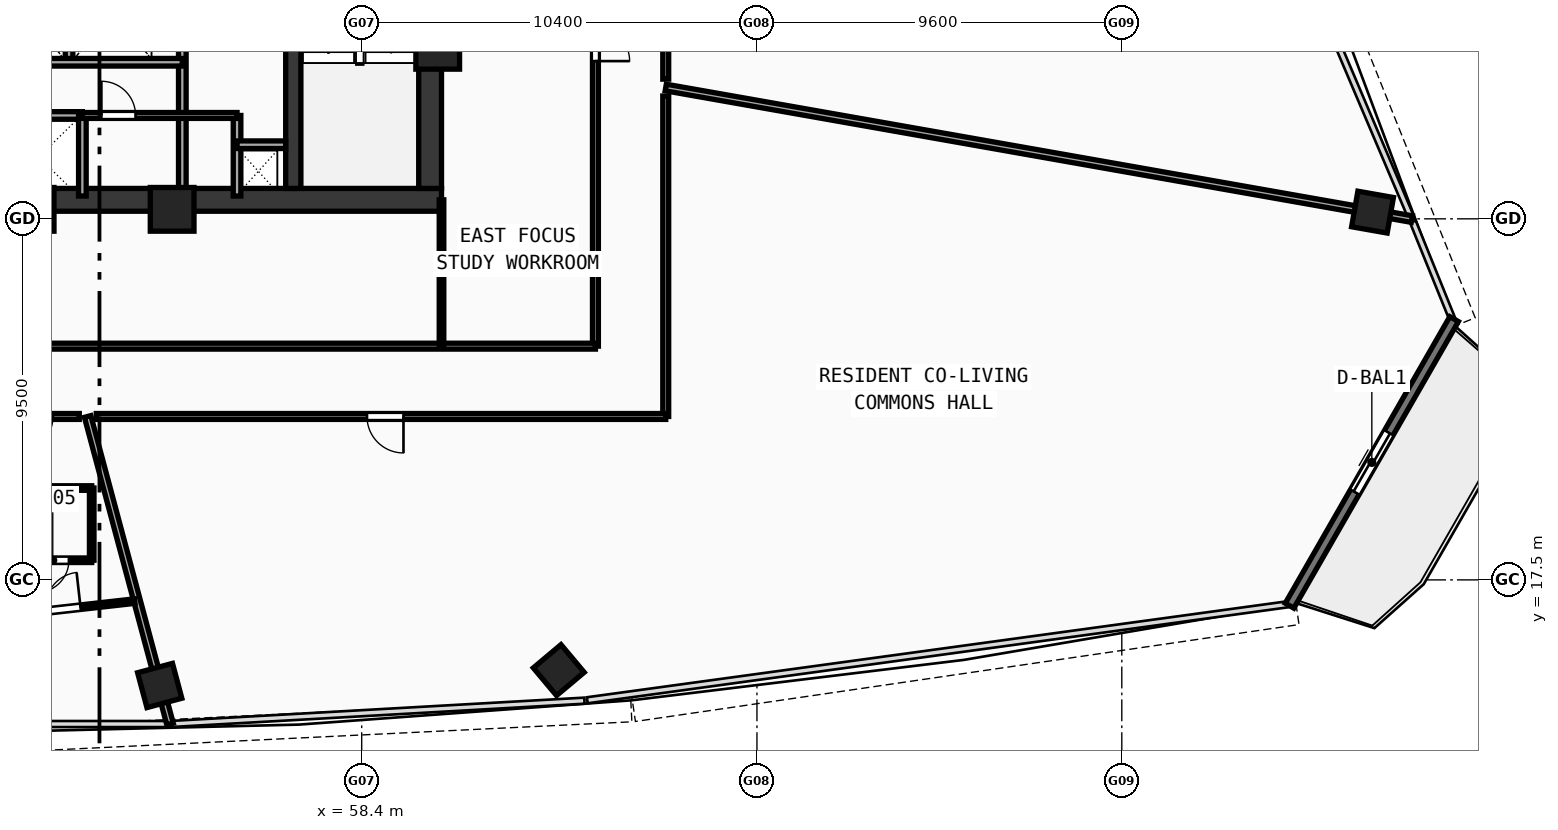
"""IFC4 building model, lengths in metres.
Left out: names, types, materials, properties, quantities, classifications, styles, units other than length and angle.
Written with IfcOpenShell. Run it as: python <this file> out.ifc"""

import sys

from ifc_helpers import new_model, si_unit, direction, frame, frame_2d, origin, origin_with_axes, origin_2d, place, context, subcontext, project, spatial, rectangle, hollow_rectangle, extrude, source, transform, mapped, element, fill, save


model = new_model("IFC4")
c1 = context("Model", 3, precision=1e-05, world=origin(), true_north=direction((0.0, 1.0)))
c2 = subcontext(c1, "Body", "Model", "MODEL_VIEW")
j1 = project(units=[si_unit("LENGTHUNIT", "METRE"), si_unit("PLANEANGLEUNIT", "RADIAN")], contexts=[c1])
p1 = place(None, origin())
s1 = spatial("IfcSite", under=j1, at=p1, CompositionType="ELEMENT")
p2 = place(p1, origin())
s2 = spatial("IfcBuilding", under=s1, at=p2, CompositionType="ELEMENT")
p3 = place(p2, frame((0.0, 0.0, 162.95)))
s3 = spatial("IfcBuildingStorey", under=s2, at=p3, CompositionType="ELEMENT", Elevation=162.95)
p4 = place(p3, frame((35.5, 27.5, 0.0), z_axis=(0.0, 0.0, 1.0), x_axis=(1.0, 0.0, 0.0)))
e1 = element("IfcWall", 1, at=p4, inside=s3, PredefinedType="SHEAR", context=c2, shape_type="SweptSolid", body=[
    extrude(rectangle(XDim=25.0, YDim=0.6, at=frame_2d((12.5, 0.0))), origin(), (0.0, 0.0, 1.0), 3.42),
])
p5 = place(p3, frame((60.2, 27.8, 0.0), z_axis=(0.0, 0.0, 1.0), x_axis=(0.0, 1.0, 0.0)))
e2 = element("IfcWall", 2, at=p5, inside=s3, PredefinedType="SHEAR", context=c2, shape_type="SweptSolid", body=[
    extrude(rectangle(XDim=12.1, YDim=0.6, at=frame_2d((6.05, 0.0))), origin(), (0.0, 0.0, 1.0), 3.42),
])
p6 = place(p3, frame((56.6, 27.8, 0.0), z_axis=(0.0, 0.0, 1.0), x_axis=(0.0, 1.0, 0.0)))
e3 = element("IfcWall", 3, at=p6, inside=s3, PredefinedType="SHEAR", context=c2, shape_type="SweptSolid", body=[
    extrude(rectangle(XDim=12.1, YDim=0.4, at=frame_2d((6.05, 0.0))), origin(), (0.0, 0.0, 1.0), 3.42),
])
p7 = place(p6, frame((9.95, 0.0, 0.0)))
e4 = element("IfcOpeningElement", 4, at=p7, cuts=e3, PredefinedType="OPENING", context=c2, shape_type="SweptSolid", body=[
    extrude(rectangle(XDim=1.1, YDim=2.1, at=frame_2d((0.55, 1.05))), frame((0.0, 0.21, 0.0), z_axis=(0.0, -1.0, 0.0), x_axis=(1.0, 0.0, 0.0)), (0.0, 0.0, 1.0), 0.42),
])
m1 = source(origin(), c2, "Body", "SweptSolid", [
    extrude(hollow_rectangle(XDim=1.15, YDim=1.15, WallThickness=0.048, at=origin_2d()), origin(), (0.0, 0.0, 1.0), 3.68),
])
for number, where, z_axis, x_axis in (
    (5, (49.729, 27.25, -0.26), (0.0, 0.0, 1.0), (1.0, 0.0, 0.0)),
    (6, (53.412, 27.25, -0.26), (0.0, 0.0, 1.0), (1.0, 0.0, 0.0)),
    (7, (60.4, 31.513, -0.26), (0.0, 0.0, 1.0), (1.0, 0.0, 0.0)),
):
    element("IfcColumn", number, at=place(p3, frame(where, z_axis=z_axis, x_axis=x_axis)), inside=s3, PredefinedType="COLUMN", context=c2, shape_type="MappedRepresentation", body=[
        mapped(m1, transform((0.0, 0.0, 0.0), scale=1.0)),
    ])
m2 = source(origin(), c2, "Body", "SweptSolid", [
    extrude(hollow_rectangle(XDim=0.95, YDim=0.95, WallThickness=0.04, at=origin_2d()), origin(), (0.0, 0.0, 1.0), 3.68),
])
for number, where, z_axis, x_axis in (
    (8, (53.085, 14.722, -0.26), (0.0, 0.0, 1.0), (0.966, 0.259, 0.0)),
    (9, (63.585, 15.126, -0.26), (0.0, 0.0, 1.0), (0.766, 0.643, 0.0)),
    (10, (84.997, 27.177, -0.26), (0.0, 0.0, 1.0), (0.174, 0.985, 0.0)),
):
    element("IfcColumn", number, at=place(p3, frame(where, z_axis=z_axis, x_axis=x_axis)), inside=s3, PredefinedType="COLUMN", context=c2, shape_type="MappedRepresentation", body=[
        mapped(m2, transform((0.0, 0.0, 0.0), scale=1.0)),
    ])
p8 = place(p3, frame((82.814, 16.821, 0.0), z_axis=(0.0, 0.0, 1.0), x_axis=(0.497939858886, 0.867211564114, 0.0)))
e11 = element("IfcWall", 11, at=p8, inside=s3, PredefinedType="STANDARD", context=c2, shape_type="SweptSolid", body=[
    extrude(rectangle(XDim=8.696, YDim=0.26, at=frame_2d((4.348, 0.0))), origin(), (0.0, 0.0, 1.0), 3.42),
])
p9 = place(p8, frame((3.448, 0.0, 0.0)))
e12 = element("IfcOpeningElement", 12, at=p9, cuts=e11, PredefinedType="OPENING", context=c2, shape_type="SweptSolid", body=[
    extrude(rectangle(XDim=1.8, YDim=2.15, at=frame_2d((0.9, 1.075))), frame((0.0, 0.14, 0.0), z_axis=(0.0, -1.0, 0.0), x_axis=(1.0, 0.0, 0.0)), (0.0, 0.0, 1.0), 0.28),
])
p10 = place(p3, frame((53.68, 27.6, 0.0), z_axis=(0.0, 0.0, 1.0), x_axis=(0.0, 1.0, 0.0)))
e13 = element("IfcWall", 13, at=p10, inside=s3, PredefinedType="SOLIDWALL", context=c2, shape_type="SweptSolid", body=[
    extrude(rectangle(XDim=9.05, YDim=0.2, at=frame_2d((4.525, 0.0))), origin(), (0.0, 0.0, 1.0), 3.42),
])
p11 = place(p10, frame((6.9, 0.0, 0.0)))
e14 = element("IfcOpeningElement", 14, at=p11, cuts=e13, PredefinedType="OPENING", context=c2, shape_type="SweptSolid", body=[
    extrude(rectangle(XDim=1.05, YDim=2.1, at=frame_2d((0.525, 1.05))), frame((0.0, 0.11, 0.0), z_axis=(0.0, -1.0, 0.0), x_axis=(1.0, 0.0, 0.0)), (0.0, 0.0, 1.0), 0.22),
])
p12 = place(p3, frame((50.7, 31.12, 0.0), z_axis=(0.0, 0.0, 1.0), x_axis=(0.0, 1.0, 0.0)))
e15 = element("IfcWall", 15, at=p12, inside=s3, PredefinedType="SOLIDWALL", context=c2, shape_type="SweptSolid", body=[
    extrude(rectangle(XDim=2.7, YDim=0.2, at=frame_2d((1.35, 0.0))), origin(), (0.0, 0.0, 1.0), 3.42),
])
p13 = place(p3, frame((43.85, 29.72, 0.0), z_axis=(0.0, 0.0, 1.0), x_axis=(1.0, 0.0, 0.0)))
e16 = element("IfcWall", 16, at=p13, inside=s3, PredefinedType="SOLIDWALL", context=c2, shape_type="SweptSolid", body=[
    extrude(rectangle(XDim=7.2, YDim=0.2, at=frame_2d((3.6, 0.0))), origin(), (0.0, 0.0, 1.0), 3.42),
])
p14 = place(p3, frame((51.05, 27.6, 0.0), z_axis=(0.0, 0.0, 1.0), x_axis=(0.0, 1.0, 0.0)))
e17 = element("IfcWall", 17, at=p14, inside=s3, PredefinedType="SOLIDWALL", context=c2, shape_type="SweptSolid", body=[
    extrude(rectangle(XDim=2.12, YDim=0.2, at=frame_2d((1.06, 0.0))), origin(), (0.0, 0.0, 1.0), 3.42),
])
p15 = place(p3, frame((43.85, 31.12, 0.0), z_axis=(0.0, 0.0, 1.0), x_axis=(1.0, 0.0, 0.0)))
e18 = element("IfcWall", 18, at=p15, inside=s3, PredefinedType="SOLIDWALL", context=c2, shape_type="SweptSolid", body=[
    extrude(rectangle(XDim=9.83, YDim=0.2, at=frame_2d((4.915, 0.0))), origin(), (0.0, 0.0, 1.0), 3.42),
])
p16 = place(p3, frame((55.12, 27.6, 0.0), z_axis=(0.0, 0.0, 1.0), x_axis=(0.0, 1.0, 0.0)))
e19 = element("IfcWall", 19, at=p16, inside=s3, PredefinedType="SOLIDWALL", context=c2, shape_type="SweptSolid", body=[
    extrude(rectangle(XDim=2.12, YDim=0.2, at=frame_2d((1.06, 0.0))), origin(), (0.0, 0.0, 1.0), 3.42),
])
p17 = place(p3, frame((55.12, 28.95, 0.0), z_axis=(0.0, 0.0, 1.0), x_axis=(1.0, 0.0, 0.0)))
e20 = element("IfcWall", 20, at=p17, inside=s3, PredefinedType="SOLIDWALL", context=c2, shape_type="SweptSolid", body=[
    extrude(rectangle(XDim=1.28, YDim=0.2, at=frame_2d((0.64, 0.0))), origin(), (0.0, 0.0, 1.0), 3.42),
])
p18 = place(p3, frame((51.05, 29.72, 0.0), z_axis=(0.0, 0.0, 1.0), x_axis=(1.0, 0.0, 0.0)))
e21 = element("IfcWall", 21, at=p18, inside=s3, PredefinedType="PARTITIONING", context=c2, shape_type="SweptSolid", body=[
    extrude(rectangle(XDim=4.07, YDim=0.155, at=frame_2d((2.035, 0.0))), origin(), (0.0, 0.0, 1.0), 3.42),
])
p19 = place(p18, frame((0.5, 0.0, 0.0)))
e22 = element("IfcOpeningElement", 22, at=p19, cuts=e21, PredefinedType="OPENING", context=c2, shape_type="SweptSolid", body=[
    extrude(rectangle(XDim=0.9, YDim=2.1, at=frame_2d((0.45, 1.05))), frame((0.0, 0.087, 0.0), z_axis=(0.0, -1.0, 0.0), x_axis=(1.0, 0.0, 0.0)), (0.0, 0.0, 1.0), 0.175),
])
p20 = place(p3, frame((64.55, 23.65, 0.0), z_axis=(0.0, 0.0, 1.0), x_axis=(0.0, 1.0, 0.0)))
e23 = element("IfcWall", 23, at=p20, inside=s3, PredefinedType="PARTITIONING", context=c2, shape_type="SweptSolid", body=[
    extrude(rectangle(XDim=16.6, YDim=0.155, at=frame_2d((8.3, 0.0))), origin(), (0.0, 0.0, 1.0), 2.77),
])
p21 = place(p20, frame((7.5, 0.0, 0.0)))
e24 = element("IfcOpeningElement", 24, at=p21, cuts=e23, PredefinedType="OPENING", context=c2, shape_type="SweptSolid", body=[
    extrude(rectangle(XDim=0.9, YDim=2.08, at=frame_2d((0.45, 1.04))), frame((0.0, 0.087, 0.0), z_axis=(0.0, -1.0, 0.0), x_axis=(1.0, 0.0, 0.0)), (0.0, 0.0, 1.0), 0.175),
])
p22 = place(p3, frame((31.45, 23.65, 0.0), z_axis=(0.0, 0.0, 1.0), x_axis=(1.0, 0.0, 0.0)))
e25 = element("IfcWall", 25, at=p22, inside=s3, PredefinedType="PARTITIONING", context=c2, shape_type="SweptSolid", body=[
    extrude(rectangle(XDim=33.1, YDim=0.155, at=frame_2d((16.55, 0.0))), origin(), (0.0, 0.0, 1.0), 2.77),
])
p23 = place(p22, frame((16.0, 0.0, 0.0)))
e26 = element("IfcOpeningElement", 26, at=p23, cuts=e25, PredefinedType="OPENING", context=c2, shape_type="SweptSolid", body=[
    extrude(rectangle(XDim=0.92, YDim=2.1, at=frame_2d((0.46, 1.05))), frame((0.0, 0.087, 0.0), z_axis=(0.0, -1.0, 0.0), x_axis=(1.0, 0.0, 0.0)), (0.0, 0.0, 1.0), 0.175),
])
p24 = place(p3, frame((60.5, 23.65, 0.0), z_axis=(0.0, 0.0, 1.0), x_axis=(0.0, 1.0, 0.0)))
e27 = element("IfcWall", 27, at=p24, inside=s3, PredefinedType="PARTITIONING", context=c2, shape_type="SweptSolid", body=[
    extrude(rectangle(XDim=3.85, YDim=0.12, at=frame_2d((1.925, 0.0))), origin(), (0.0, 0.0, 1.0), 3.02),
])
p25 = place(p3, frame((51.189, 21.8, 0.0), z_axis=(0.0, 0.0, 1.0), x_axis=(0.258819593461, -0.965925679357, 0.0)))
e28 = element("IfcWall", 28, at=p25, inside=s3, PredefinedType="PARTITIONING", context=c2, shape_type="SweptSolid", body=[
    extrude(rectangle(XDim=8.378, YDim=0.175, at=frame_2d((4.189, 0.0))), origin(), (0.0, 0.0, 1.0), 2.77),
])
p26 = place(p3, frame((66.4, 30.456, 0.0), z_axis=(0.0, 0.0, 1.0), x_axis=(0.984808700761, -0.173642802629, 0.0)))
e29 = element("IfcWall", 29, at=p26, inside=s3, PredefinedType="PARTITIONING", context=c2, shape_type="SweptSolid", body=[
    extrude(rectangle(XDim=19.934, YDim=0.175, at=frame_2d((9.967, 0.0))), origin(), (0.0, 0.0, 1.0), 2.77),
])
p27 = place(p3, frame((66.4, 34.767, 0.0), z_axis=(0.0, 0.0, 1.0), x_axis=(0.0, -1.0, 0.0)))
e30 = element("IfcWall", 30, at=p27, inside=s3, PredefinedType="PARTITIONING", context=c2, shape_type="SweptSolid", body=[
    extrude(rectangle(XDim=4.092, YDim=0.155, at=frame_2d((2.046, 0.0))), origin(), (0.0, 0.0, 1.0), 3.42),
])
p28 = place(p27, frame((1.571, 0.0, 0.0)))
e31 = element("IfcOpeningElement", 31, at=p28, cuts=e30, PredefinedType="OPENING", context=c2, shape_type="SweptSolid", body=[
    extrude(rectangle(XDim=0.96, YDim=2.12, at=frame_2d((0.48, 1.06))), frame((0.0, 0.087, 0.0), z_axis=(0.0, -1.0, 0.0), x_axis=(1.0, 0.0, 0.0)), (0.0, 0.0, 1.0), 0.175),
])
p29 = place(p3, frame((66.4, 30.232, 0.0), z_axis=(0.0, 0.0, 1.0), x_axis=(0.0, -1.0, 0.0)))
e32 = element("IfcWall", 32, at=p29, inside=s3, PredefinedType="PARTITIONING", context=c2, shape_type="SweptSolid", body=[
    extrude(rectangle(XDim=8.432, YDim=0.155, at=frame_2d((4.216, 0.0))), origin(), (0.0, 0.0, 1.0), 3.02),
])
p30 = place(p3, frame((66.4, 21.8, 0.0), z_axis=(0.0, 0.0, 1.0), x_axis=(-1.0, 0.0, 0.0)))
e33 = element("IfcWall", 33, at=p30, inside=s3, PredefinedType="PARTITIONING", context=c2, shape_type="SweptSolid", body=[
    extrude(rectangle(XDim=14.983, YDim=0.155, at=frame_2d((7.492, 0.0))), origin(), (0.0, 0.0, 1.0), 2.77),
])
p31 = place(p30, frame((6.901, 0.0, 0.0)))
e34 = element("IfcOpeningElement", 34, at=p31, cuts=e33, PredefinedType="OPENING", context=c2, shape_type="SweptSolid", body=[
    extrude(rectangle(XDim=0.96, YDim=2.12, at=frame_2d((0.48, 1.06))), frame((0.0, 0.087, 0.0), z_axis=(0.0, -1.0, 0.0), x_axis=(1.0, 0.0, 0.0)), (0.0, 0.0, 1.0), 0.175),
])
p32 = place(p3, frame((50.969, 21.8, 0.0), z_axis=(0.0, 0.0, 1.0), x_axis=(-1.0, 0.0, 0.0)))
e35 = element("IfcWall", 35, at=p32, inside=s3, PredefinedType="PARTITIONING", context=c2, shape_type="SweptSolid", body=[
    extrude(rectangle(XDim=2.333, YDim=0.155, at=frame_2d((1.167, 0.0))), origin(), (0.0, 0.0, 1.0), 3.42),
])
p33 = place(p32, frame((0.692, 0.0, 0.0)))
e36 = element("IfcOpeningElement", 36, at=p33, cuts=e35, PredefinedType="OPENING", context=c2, shape_type="SweptSolid", body=[
    extrude(rectangle(XDim=0.96, YDim=2.12, at=frame_2d((0.48, 1.06))), frame((0.0, 0.087, 0.0), z_axis=(0.0, -1.0, 0.0), x_axis=(1.0, 0.0, 0.0)), (0.0, 0.0, 1.0), 0.175),
])
p34 = place(p3, frame((49.246, 18.017, 0.0), z_axis=(0.0, 0.0, 1.0), x_axis=(1.0, 0.0, 0.0)))
e37 = element("IfcWall", 37, at=p34, inside=s3, PredefinedType="PARTITIONING", context=c2, shape_type="SweptSolid", body=[
    extrude(rectangle(XDim=2.05, YDim=0.12, at=frame_2d((1.025, 0.0))), origin(), (0.0, 0.0, 1.0), 3.42),
])
p35 = place(p34, frame((0.6, 0.0, 0.0)))
e38 = element("IfcOpeningElement", 38, at=p35, cuts=e37, PredefinedType="OPENING", context=c2, shape_type="SweptSolid", body=[
    extrude(rectangle(XDim=0.85, YDim=2.1, at=frame_2d((0.425, 1.05))), frame((0.0, 0.07, 0.0), z_axis=(0.0, -1.0, 0.0), x_axis=(1.0, 0.0, 0.0)), (0.0, 0.0, 1.0), 0.14),
])
p36 = place(p3, frame((51.296, 18.017, 0.0), z_axis=(0.0, 0.0, 1.0), x_axis=(0.0, 1.0, 0.0)))
e39 = element("IfcWall", 39, at=p36, inside=s3, PredefinedType="PARTITIONING", context=c2, shape_type="SweptSolid", body=[
    extrude(rectangle(XDim=1.9, YDim=0.12, at=frame_2d((0.95, 0.0))), origin(), (0.0, 0.0, 1.0), 3.02),
])
p37 = place(p3, frame((51.296, 19.917, 0.0), z_axis=(0.0, 0.0, 1.0), x_axis=(-1.0, 0.0, 0.0)))
e40 = element("IfcWall", 40, at=p37, inside=s3, PredefinedType="PARTITIONING", context=c2, shape_type="SweptSolid", body=[
    extrude(rectangle(XDim=2.05, YDim=0.12, at=frame_2d((1.025, 0.0))), origin(), (0.0, 0.0, 1.0), 3.42),
])
p38 = place(p3, frame((48.66, 16.518, 0.0), z_axis=(0.0, 0.0, 1.0), x_axis=(0.993740790244, 0.111710526829, 0.0)))
e41 = element("IfcWall", 41, at=p38, inside=s3, PredefinedType="PARTITIONING", context=c2, shape_type="SweptSolid", body=[
    extrude(rectangle(XDim=3.792, YDim=0.12, at=frame_2d((1.896, 0.0))), origin(), (0.0, 0.0, 1.0), 2.77),
])
p39 = place(p38, frame((1.436, 0.0, 0.0)))
e42 = element("IfcOpeningElement", 42, at=p39, cuts=e41, PredefinedType="OPENING", context=c2, shape_type="SweptSolid", body=[
    extrude(rectangle(XDim=0.92, YDim=2.1, at=frame_2d((0.46, 1.05))), frame((0.0, 0.07, 0.0), z_axis=(0.0, -1.0, 0.0), x_axis=(1.0, 0.0, 0.0)), (0.0, 0.0, 1.0), 0.14),
])
m3 = source(origin(), c2, "Body", "SweptSolid", [
    extrude(rectangle(XDim=1.8, YDim=2.15, at=frame_2d((0.9, 1.075))), frame((0.0, 0.025, 0.0), z_axis=(0.0, -1.0, 0.0), x_axis=(1.0, 0.0, 0.0)), (0.0, 0.0, 1.0), 0.05),
])
p40 = place(p9, origin_with_axes())
e43 = element("IfcDoor", 43, at=p40, inside=s3, OperationType="DOUBLE_DOOR_SLIDING", PredefinedType="DOOR", context=c2, shape_type="MappedRepresentation", body=[
    mapped(m3, transform((0.0, 0.0, 0.0), scale=1.0)),
])
fill(e12, e43)
m4 = source(origin(), c2, "Body", "SweptSolid", [
    extrude(rectangle(XDim=0.9, YDim=2.1, at=frame_2d((0.45, 1.05))), frame((0.0, 0.025, 0.0), z_axis=(0.0, -1.0, 0.0), x_axis=(1.0, 0.0, 0.0)), (0.0, 0.0, 1.0), 0.05),
])
p41 = place(p19, origin_with_axes())
e44 = element("IfcDoor", 44, at=p41, inside=s3, OperationType="SINGLE_SWING_LEFT", PredefinedType="DOOR", context=c2, shape_type="MappedRepresentation", body=[
    mapped(m4, transform((0.0, 0.0, 0.0), scale=1.0)),
])
fill(e22, e44)
m5 = source(origin(), c2, "Body", "SweptSolid", [
    extrude(rectangle(XDim=0.9, YDim=2.08, at=frame_2d((0.45, 1.04))), frame((0.0, 0.025, 0.0), z_axis=(0.0, -1.0, 0.0), x_axis=(1.0, 0.0, 0.0)), (0.0, 0.0, 1.0), 0.05),
])
p42 = place(p21, frame((0.9, 0.0, 0.0), z_axis=(0.0, 0.0, 1.0), x_axis=(-1.0, 0.0, 0.0)))
e45 = element("IfcDoor", 45, at=p42, inside=s3, OperationType="SINGLE_SWING_RIGHT", PredefinedType="DOOR", context=c2, shape_type="MappedRepresentation", body=[
    mapped(m5, transform((0.0, 0.0, 0.0), scale=1.0)),
])
fill(e24, e45)
m6 = source(origin(), c2, "Body", "SweptSolid", [
    extrude(rectangle(XDim=0.96, YDim=2.12, at=frame_2d((0.48, 1.06))), frame((0.0, 0.025, 0.0), z_axis=(0.0, -1.0, 0.0), x_axis=(1.0, 0.0, 0.0)), (0.0, 0.0, 1.0), 0.05),
])
p43 = place(p33, origin_with_axes())
e46 = element("IfcDoor", 46, at=p43, inside=s3, OperationType="SINGLE_SWING_RIGHT", PredefinedType="DOOR", context=c2, shape_type="MappedRepresentation", body=[
    mapped(m6, transform((0.0, 0.0, 0.0), scale=1.0)),
])
fill(e36, e46)
m7 = source(origin(), c2, "Body", "SweptSolid", [
    extrude(rectangle(XDim=0.85, YDim=2.1, at=frame_2d((0.425, 1.05))), frame((0.0, 0.025, 0.0), z_axis=(0.0, -1.0, 0.0), x_axis=(1.0, 0.0, 0.0)), (0.0, 0.0, 1.0), 0.05),
])
p44 = place(p35, frame((0.85, 0.0, 0.0), z_axis=(0.0, 0.0, 1.0), x_axis=(-1.0, 0.0, 0.0)))
e47 = element("IfcDoor", 47, at=p44, inside=s3, OperationType="SINGLE_SWING_RIGHT", PredefinedType="DOOR", context=c2, shape_type="MappedRepresentation", body=[
    mapped(m7, transform((0.0, 0.0, 0.0), scale=1.0)),
])
fill(e38, e47)
m8 = source(origin(), c2, "Body", "SweptSolid", [
    extrude(rectangle(XDim=0.92, YDim=2.1, at=frame_2d((0.46, 1.05))), frame((0.0, 0.025, 0.0), z_axis=(0.0, -1.0, 0.0), x_axis=(1.0, 0.0, 0.0)), (0.0, 0.0, 1.0), 0.05),
])
p45 = place(p39, origin_with_axes())
e48 = element("IfcDoor", 48, at=p45, inside=s3, OperationType="SINGLE_SWING_RIGHT", PredefinedType="DOOR", context=c2, shape_type="MappedRepresentation", body=[
    mapped(m8, transform((0.0, 0.0, 0.0), scale=1.0)),
])
fill(e42, e48)
p46 = place(p31, origin_with_axes())
e49 = element("IfcDoor", 49, at=p46, inside=s3, OperationType="SINGLE_SWING_LEFT", PredefinedType="DOOR", context=c2, shape_type="MappedRepresentation", body=[
    mapped(m6, transform((0.0, 0.0, 0.0), scale=1.0)),
])
fill(e34, e49)
save(model, sys.argv[1])
